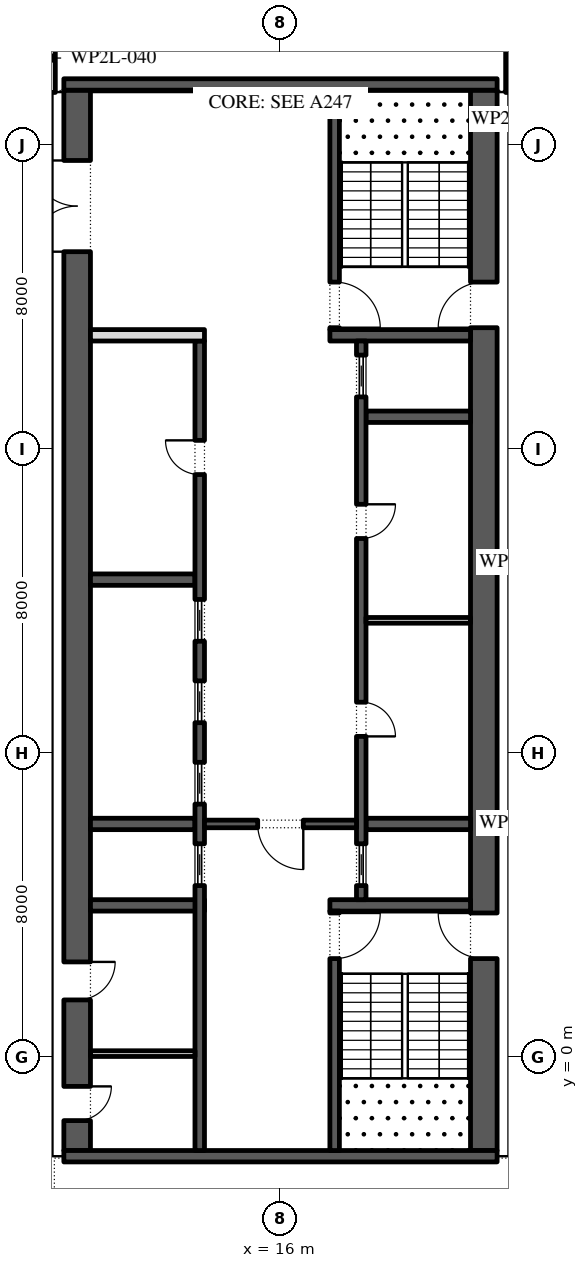
"""IFC4 building model, lengths in metres.
Left out: names, types, materials, properties, quantities, classifications, styles, units other than length and angle.
Written with IfcOpenShell. Run it as: python <this file> out.ifc"""

import sys

from ifc_helpers import new_model, si_unit, direction, frame, frame_2d, origin, place, context, subcontext, project, spatial, rectangle, extrude, element, fill, save


model = new_model("IFC4")
c1 = context("Model", 3, precision=1e-05, world=origin(), true_north=direction((0.0, 1.0)))
c2 = subcontext(c1, "Body", "Model", "MODEL_VIEW")
j1 = project(units=[si_unit("LENGTHUNIT", "METRE"), si_unit("PLANEANGLEUNIT", "RADIAN")], contexts=[c1])
p1 = place(None, origin())
s1 = spatial("IfcSite", under=j1, at=p1, CompositionType="ELEMENT")
p2 = place(p1, origin())
s2 = spatial("IfcBuilding", under=s1, at=p2, CompositionType="ELEMENT")
p3 = place(p2, frame((0.0, 0.0, 201.0)))
s3 = spatial("IfcBuildingStorey", under=s2, at=p3, CompositionType="ELEMENT", Elevation=201.0)
p4 = place(p3, frame((33.157, -5.092, 0.0), z_axis=(0.0, 0.0, 1.0), x_axis=(-0.224950279389, 0.974370243697, 0.0)))
e1 = element("IfcWall", 1, at=p4, inside=s3, PredefinedType="STANDARD", context=c2, shape_type="SweptSolid", body=[
    extrude(rectangle(XDim=49.5, YDim=0.3, at=frame_2d((24.75, 0.0))), origin(), (0.0, 0.0, 1.0), 4.0),
])
p5 = place(p4, frame((2.207, 0.0, 0.0)))
e2 = element("IfcOpeningElement", 2, at=p5, cuts=e1, PredefinedType="OPENING", context=c2, shape_type="SweptSolid", body=[
    extrude(rectangle(XDim=2.4, YDim=3.125, at=frame_2d((1.2, 1.562))), frame((0.0, 0.16, 0.0), z_axis=(0.0, -1.0, 0.0), x_axis=(1.0, 0.0, 0.0)), (0.0, 0.0, 1.0), 0.32),
])
p6 = place(p4, frame((8.121, 0.0, 0.45)))
e3 = element("IfcOpeningElement", 3, at=p6, cuts=e1, PredefinedType="OPENING", context=c2, shape_type="SweptSolid", body=[
    extrude(rectangle(XDim=4.5, YDim=2.875, at=frame_2d((2.25, 1.438))), frame((0.0, 0.16, 0.0), z_axis=(0.0, -1.0, 0.0), x_axis=(1.0, 0.0, 0.0)), (0.0, 0.0, 1.0), 0.32),
])
p7 = place(p4, frame((15.236, 0.0, 0.45)))
e4 = element("IfcOpeningElement", 4, at=p7, cuts=e1, PredefinedType="OPENING", context=c2, shape_type="SweptSolid", body=[
    extrude(rectangle(XDim=4.5, YDim=2.875, at=frame_2d((2.25, 1.438))), frame((0.0, 0.16, 0.0), z_axis=(0.0, -1.0, 0.0), x_axis=(1.0, 0.0, 0.0)), (0.0, 0.0, 1.0), 0.32),
])
p8 = place(p4, frame((22.35, 0.0, 0.45)))
e5 = element("IfcOpeningElement", 5, at=p8, cuts=e1, PredefinedType="OPENING", context=c2, shape_type="SweptSolid", body=[
    extrude(rectangle(XDim=4.5, YDim=3.0, at=frame_2d((2.25, 1.5))), frame((0.0, 0.16, 0.0), z_axis=(0.0, -1.0, 0.0), x_axis=(1.0, 0.0, 0.0)), (0.0, 0.0, 1.0), 0.32),
])
p9 = place(p4, frame((30.514, 0.0, 0.0)))
e6 = element("IfcOpeningElement", 6, at=p9, cuts=e1, PredefinedType="OPENING", context=c2, shape_type="SweptSolid", body=[
    extrude(rectangle(XDim=2.4, YDim=3.45, at=frame_2d((1.2, 1.725))), frame((0.0, 0.16, 0.0), z_axis=(0.0, -1.0, 0.0), x_axis=(1.0, 0.0, 0.0)), (0.0, 0.0, 1.0), 0.32),
])
p10 = place(p4, frame((36.579, 0.0, 0.45)))
e7 = element("IfcOpeningElement", 7, at=p10, cuts=e1, PredefinedType="OPENING", context=c2, shape_type="SweptSolid", body=[
    extrude(rectangle(XDim=4.5, YDim=3.05, at=frame_2d((2.25, 1.525))), frame((0.0, 0.16, 0.0), z_axis=(0.0, -1.0, 0.0), x_axis=(1.0, 0.0, 0.0)), (0.0, 0.0, 1.0), 0.32),
])
p11 = place(p4, frame((43.693, 0.0, 0.45)))
e8 = element("IfcOpeningElement", 8, at=p11, cuts=e1, PredefinedType="OPENING", context=c2, shape_type="SweptSolid", body=[
    extrude(rectangle(XDim=4.5, YDim=3.05, at=frame_2d((2.25, 1.525))), frame((0.0, 0.16, 0.0), z_axis=(0.0, -1.0, 0.0), x_axis=(1.0, 0.0, 0.0)), (0.0, 0.0, 1.0), 0.32),
])
p12 = place(p3, frame((21.35, -2.45, 0.0), z_axis=(0.0, 0.0, 1.0), x_axis=(0.0, 1.0, 0.0)))
e9 = element("IfcWall", 9, at=p12, inside=s3, PredefinedType="SHEAR", context=c2, shape_type="SweptSolid", body=[
    extrude(rectangle(XDim=27.9, YDim=0.7, at=frame_2d((13.95, 0.0))), origin(), (0.0, 0.0, 1.0), 4.0),
])
p13 = place(p12, frame((5.05, 0.0, 0.0)))
e10 = element("IfcOpeningElement", 10, at=p13, cuts=e9, PredefinedType="OPENING", context=c2, shape_type="SweptSolid", body=[
    extrude(rectangle(XDim=1.2, YDim=2.1, at=frame_2d((0.6, 1.05))), frame((0.0, 0.36, 0.0), z_axis=(0.0, -1.0, 0.0), x_axis=(1.0, 0.0, 0.0)), (0.0, 0.0, 1.0), 0.72),
])
p14 = place(p12, frame((21.65, 0.0, 0.0)))
e11 = element("IfcOpeningElement", 11, at=p14, cuts=e9, PredefinedType="OPENING", context=c2, shape_type="SweptSolid", body=[
    extrude(rectangle(XDim=1.2, YDim=2.1, at=frame_2d((0.6, 1.05))), frame((0.0, 0.36, 0.0), z_axis=(0.0, -1.0, 0.0), x_axis=(1.0, 0.0, 0.0)), (0.0, 0.0, 1.0), 0.72),
])
p15 = place(p3, frame((10.65, -2.45, 0.0), z_axis=(0.0, 0.0, 1.0), x_axis=(0.0, 1.0, 0.0)))
e12 = element("IfcWall", 12, at=p15, inside=s3, PredefinedType="SHEAR", context=c2, shape_type="SweptSolid", body=[
    extrude(rectangle(XDim=27.9, YDim=0.7, at=frame_2d((13.95, 0.0))), origin(), (0.0, 0.0, 1.0), 4.0),
])
p16 = place(p15, frame((23.65, 0.0, 0.0)))
e13 = element("IfcOpeningElement", 13, at=p16, cuts=e12, PredefinedType="OPENING", context=c2, shape_type="SweptSolid", body=[
    extrude(rectangle(XDim=2.4, YDim=2.1, at=frame_2d((1.2, 1.05))), frame((0.0, 0.36, 0.0), z_axis=(0.0, -1.0, 0.0), x_axis=(1.0, 0.0, 0.0)), (0.0, 0.0, 1.0), 0.72),
])
p17 = place(p15, frame((0.788, 0.0, 0.0)))
e14 = element("IfcOpeningElement", 14, at=p17, cuts=e12, PredefinedType="OPENING", context=c2, shape_type="SweptSolid", body=[
    extrude(rectangle(XDim=0.9, YDim=2.1, at=frame_2d((0.45, 1.05))), frame((0.0, 0.36, 0.0), z_axis=(0.0, -1.0, 0.0), x_axis=(1.0, 0.0, 0.0)), (0.0, 0.0, 1.0), 0.72),
])
p18 = place(p15, frame((3.962, 0.0, 0.0)))
e15 = element("IfcOpeningElement", 15, at=p18, cuts=e12, PredefinedType="OPENING", context=c2, shape_type="SweptSolid", body=[
    extrude(rectangle(XDim=1.0, YDim=2.1, at=frame_2d((0.5, 1.05))), frame((0.0, 0.36, 0.0), z_axis=(0.0, -1.0, 0.0), x_axis=(1.0, 0.0, 0.0)), (0.0, 0.0, 1.0), 0.72),
])
for number, where, z_axis, x_axis in (
    (16, (10.3, -2.6, 0.0), (0.0, 0.0, 1.0), (1.0, 0.0, 0.0)),
    (17, (10.3, 25.6, 0.0), (0.0, 0.0, 1.0), (1.0, 0.0, 0.0)),
):
    element("IfcWall", number, at=place(p3, frame(where, z_axis=z_axis, x_axis=x_axis)), inside=s3, PredefinedType="SHEAR", context=c2, shape_type="SweptSolid", body=[
        extrude(rectangle(XDim=11.4, YDim=0.3, at=frame_2d((5.7, 0.0))), origin(), (0.0, 0.0, 1.0), 4.0),
    ])
p19 = place(p3, frame((17.3, 4.0, 0.0), z_axis=(0.0, 0.0, 1.0), x_axis=(1.0, 0.0, 0.0)))
e18 = element("IfcWall", 18, at=p19, inside=s3, PredefinedType="SHEAR", context=c2, shape_type="SweptSolid", body=[
    extrude(rectangle(XDim=3.7, YDim=0.3, at=frame_2d((1.85, 0.0))), origin(), (0.0, 0.0, 1.0), 4.0),
])
p20 = place(p3, frame((17.425, -2.45, 0.0), z_axis=(0.0, 0.0, 1.0), x_axis=(0.0, 1.0, 0.0)))
e19 = element("IfcWall", 19, at=p20, inside=s3, PredefinedType="SHEAR", context=c2, shape_type="SweptSolid", body=[
    extrude(rectangle(XDim=6.3, YDim=0.25, at=frame_2d((3.15, 0.0))), origin(), (0.0, 0.0, 1.0), 4.0),
])
p21 = place(p20, frame((5.05, 0.0, 0.0)))
e20 = element("IfcOpeningElement", 20, at=p21, cuts=e19, PredefinedType="OPENING", context=c2, shape_type="SweptSolid", body=[
    extrude(rectangle(XDim=1.2, YDim=2.1, at=frame_2d((0.6, 1.05))), frame((0.0, 0.135, 0.0), z_axis=(0.0, -1.0, 0.0), x_axis=(1.0, 0.0, 0.0)), (0.0, 0.0, 1.0), 0.27),
])
p22 = place(p3, frame((17.3, 19.0, 0.0), z_axis=(0.0, 0.0, 1.0), x_axis=(1.0, 0.0, 0.0)))
e21 = element("IfcWall", 21, at=p22, inside=s3, PredefinedType="SHEAR", context=c2, shape_type="SweptSolid", body=[
    extrude(rectangle(XDim=3.7, YDim=0.3, at=frame_2d((1.85, 0.0))), origin(), (0.0, 0.0, 1.0), 4.0),
])
p23 = place(p3, frame((17.425, 19.15, 0.0), z_axis=(0.0, 0.0, 1.0), x_axis=(0.0, 1.0, 0.0)))
e22 = element("IfcWall", 22, at=p23, inside=s3, PredefinedType="SHEAR", context=c2, shape_type="SweptSolid", body=[
    extrude(rectangle(XDim=6.3, YDim=0.25, at=frame_2d((3.15, 0.0))), origin(), (0.0, 0.0, 1.0), 4.0),
])
p24 = place(p23, frame((0.05, 0.0, 0.0)))
e23 = element("IfcOpeningElement", 23, at=p24, cuts=e22, PredefinedType="OPENING", context=c2, shape_type="SweptSolid", body=[
    extrude(rectangle(XDim=1.2, YDim=2.1, at=frame_2d((0.6, 1.05))), frame((0.0, 0.135, 0.0), z_axis=(0.0, -1.0, 0.0), x_axis=(1.0, 0.0, 0.0)), (0.0, 0.0, 1.0), 0.27),
])
for number, where, z_axis, x_axis in (
    (24, (18.25, 6.143, 0.0), (0.0, 0.0, 1.0), (1.0, 0.0, 0.0)),
    (25, (18.25, 16.857, 0.0), (0.0, 0.0, 1.0), (1.0, 0.0, 0.0)),
):
    element("IfcWall", number, at=place(p3, frame(where, z_axis=z_axis, x_axis=x_axis)), inside=s3, PredefinedType="SHEAR", context=c2, shape_type="SweptSolid", body=[
        extrude(rectangle(XDim=2.75, YDim=0.3, at=frame_2d((1.375, 0.0))), origin(), (0.0, 0.0, 1.0), 4.0),
    ])
p25 = place(p3, frame((18.125, 4.15, 0.0), z_axis=(0.0, 0.0, 1.0), x_axis=(0.0, 1.0, 0.0)))
e26 = element("IfcWall", 26, at=p25, inside=s3, PredefinedType="SHEAR", context=c2, shape_type="SweptSolid", body=[
    extrude(rectangle(XDim=14.7, YDim=0.25, at=frame_2d((7.35, 0.0))), origin(), (0.0, 0.0, 1.0), 4.0),
])
p26 = place(p25, frame((4.296, 0.0, 0.0)))
e27 = element("IfcOpeningElement", 27, at=p26, cuts=e26, PredefinedType="OPENING", context=c2, shape_type="SweptSolid", body=[
    extrude(rectangle(XDim=0.9, YDim=2.1, at=frame_2d((0.45, 1.05))), frame((0.0, 0.135, 0.0), z_axis=(0.0, -1.0, 0.0), x_axis=(1.0, 0.0, 0.0)), (0.0, 0.0, 1.0), 0.27),
])
p27 = place(p25, frame((9.504, 0.0, 0.0)))
e28 = element("IfcOpeningElement", 28, at=p27, cuts=e26, PredefinedType="OPENING", context=c2, shape_type="SweptSolid", body=[
    extrude(rectangle(XDim=0.9, YDim=2.1, at=frame_2d((0.45, 1.05))), frame((0.0, 0.135, 0.0), z_axis=(0.0, -1.0, 0.0), x_axis=(1.0, 0.0, 0.0)), (0.0, 0.0, 1.0), 0.27),
])
p28 = place(p25, frame((0.371, 0.0, 0.0)))
e29 = element("IfcOpeningElement", 29, at=p28, cuts=e26, PredefinedType="OPENING", context=c2, shape_type="SweptSolid", body=[
    extrude(rectangle(XDim=1.1, YDim=2.1, at=frame_2d((0.55, 1.05))), frame((0.0, 0.135, 0.0), z_axis=(0.0, -1.0, 0.0), x_axis=(1.0, 0.0, 0.0)), (0.0, 0.0, 1.0), 0.27),
])
p29 = place(p25, frame((13.229, 0.0, 0.0)))
e30 = element("IfcOpeningElement", 30, at=p29, cuts=e26, PredefinedType="OPENING", context=c2, shape_type="SweptSolid", body=[
    extrude(rectangle(XDim=1.1, YDim=2.1, at=frame_2d((0.55, 1.05))), frame((0.0, 0.135, 0.0), z_axis=(0.0, -1.0, 0.0), x_axis=(1.0, 0.0, 0.0)), (0.0, 0.0, 1.0), 0.27),
])
p30 = place(p3, frame((18.25, 11.5, 0.0), z_axis=(0.0, 0.0, 1.0), x_axis=(1.0, 0.0, 0.0)))
e31 = element("IfcWall", 31, at=p30, inside=s3, PredefinedType="PARTITIONING", context=c2, shape_type="SweptSolid", body=[
    extrude(rectangle(XDim=2.75, YDim=0.15, at=frame_2d((1.375, 0.0))), origin(), (0.0, 0.0, 1.0), 4.0),
])
p31 = place(p3, frame((11.0, 4.0, 0.0), z_axis=(0.0, 0.0, 1.0), x_axis=(1.0, 0.0, 0.0)))
e32 = element("IfcWall", 32, at=p31, inside=s3, PredefinedType="SHEAR", context=c2, shape_type="SweptSolid", body=[
    extrude(rectangle(XDim=3.0, YDim=0.3, at=frame_2d((1.5, 0.0))), origin(), (0.0, 0.0, 1.0), 4.0),
])
for number, where, z_axis, x_axis in (
    (33, (11.0, 6.143, 0.0), (0.0, 0.0, 1.0), (1.0, 0.0, 0.0)),
    (34, (11.0, 12.571, 0.0), (0.0, 0.0, 1.0), (1.0, 0.0, 0.0)),
):
    element("IfcWall", number, at=place(p3, frame(where, z_axis=z_axis, x_axis=x_axis)), inside=s3, PredefinedType="SHEAR", context=c2, shape_type="SweptSolid", body=[
        extrude(rectangle(XDim=2.75, YDim=0.3, at=frame_2d((1.375, 0.0))), origin(), (0.0, 0.0, 1.0), 4.0),
    ])
p32 = place(p3, frame((13.875, -2.45, 0.0), z_axis=(0.0, 0.0, 1.0), x_axis=(0.0, 1.0, 0.0)))
e35 = element("IfcWall", 35, at=p32, inside=s3, PredefinedType="SHEAR", context=c2, shape_type="SweptSolid", body=[
    extrude(rectangle(XDim=21.3, YDim=0.25, at=frame_2d((10.65, 0.0))), origin(), (0.0, 0.0, 1.0), 4.0),
])
p33 = place(p32, frame((17.786, 0.0, 0.0)))
e36 = element("IfcOpeningElement", 36, at=p33, cuts=e35, PredefinedType="OPENING", context=c2, shape_type="SweptSolid", body=[
    extrude(rectangle(XDim=0.9, YDim=2.1, at=frame_2d((0.45, 1.05))), frame((0.0, 0.135, 0.0), z_axis=(0.0, -1.0, 0.0), x_axis=(1.0, 0.0, 0.0)), (0.0, 0.0, 1.0), 0.27),
])
p34 = place(p32, frame((6.971, 0.0, 0.0)))
e37 = element("IfcOpeningElement", 37, at=p34, cuts=e35, PredefinedType="OPENING", context=c2, shape_type="SweptSolid", body=[
    extrude(rectangle(XDim=1.1, YDim=2.1, at=frame_2d((0.55, 1.05))), frame((0.0, 0.135, 0.0), z_axis=(0.0, -1.0, 0.0), x_axis=(1.0, 0.0, 0.0)), (0.0, 0.0, 1.0), 0.27),
])
p35 = place(p32, frame((9.114, 0.0, 0.0)))
e38 = element("IfcOpeningElement", 38, at=p35, cuts=e35, PredefinedType="OPENING", context=c2, shape_type="SweptSolid", body=[
    extrude(rectangle(XDim=1.1, YDim=2.1, at=frame_2d((0.55, 1.05))), frame((0.0, 0.135, 0.0), z_axis=(0.0, -1.0, 0.0), x_axis=(1.0, 0.0, 0.0)), (0.0, 0.0, 1.0), 0.27),
])
p36 = place(p32, frame((11.257, 0.0, 0.0)))
e39 = element("IfcOpeningElement", 39, at=p36, cuts=e35, PredefinedType="OPENING", context=c2, shape_type="SweptSolid", body=[
    extrude(rectangle(XDim=1.1, YDim=2.1, at=frame_2d((0.55, 1.05))), frame((0.0, 0.135, 0.0), z_axis=(0.0, -1.0, 0.0), x_axis=(1.0, 0.0, 0.0)), (0.0, 0.0, 1.0), 0.27),
])
p37 = place(p32, frame((13.4, 0.0, 0.0)))
e40 = element("IfcOpeningElement", 40, at=p37, cuts=e35, PredefinedType="OPENING", context=c2, shape_type="SweptSolid", body=[
    extrude(rectangle(XDim=1.1, YDim=2.1, at=frame_2d((0.55, 1.05))), frame((0.0, 0.135, 0.0), z_axis=(0.0, -1.0, 0.0), x_axis=(1.0, 0.0, 0.0)), (0.0, 0.0, 1.0), 0.27),
])
p38 = place(p3, frame((11.0, 19.0, 0.0), z_axis=(0.0, 0.0, 1.0), x_axis=(1.0, 0.0, 0.0)))
e41 = element("IfcWall", 41, at=p38, inside=s3, PredefinedType="PARTITIONING", context=c2, shape_type="SweptSolid", body=[
    extrude(rectangle(XDim=3.0, YDim=0.3, at=frame_2d((1.5, 0.0))), origin(), (0.0, 0.0, 1.0), 4.0),
])
p39 = place(p3, frame((14.0, 6.143, 0.0), z_axis=(0.0, 0.0, 1.0), x_axis=(1.0, 0.0, 0.0)))
e42 = element("IfcWall", 42, at=p39, inside=s3, PredefinedType="SHEAR", context=c2, shape_type="SweptSolid", body=[
    extrude(rectangle(XDim=4.0, YDim=0.2, at=frame_2d((2.0, 0.0))), origin(), (0.0, 0.0, 1.0), 4.0),
])
p40 = place(p39, frame((1.4, 0.0, 0.0)))
e43 = element("IfcOpeningElement", 43, at=p40, cuts=e42, PredefinedType="OPENING", context=c2, shape_type="SweptSolid", body=[
    extrude(rectangle(XDim=1.2, YDim=2.1, at=frame_2d((0.6, 1.05))), frame((0.0, 0.11, 0.0), z_axis=(0.0, -1.0, 0.0), x_axis=(1.0, 0.0, 0.0)), (0.0, 0.0, 1.0), 0.22),
])
p41 = place(p3, frame((11.0, 0.1, 0.0), z_axis=(0.0, 0.0, 1.0), x_axis=(1.0, 0.0, 0.0)))
e44 = element("IfcWall", 44, at=p41, inside=s3, PredefinedType="PARTITIONING", context=c2, shape_type="SweptSolid", body=[
    extrude(rectangle(XDim=2.75, YDim=0.15, at=frame_2d((1.375, 0.0))), origin(), (0.0, 0.0, 1.0), 4.0),
])
p42 = place(p3, frame((10.0, 27.2, 0.0), z_axis=(0.0, 0.0, 1.0), x_axis=(0.0, -1.0, 0.0)))
e45 = element("IfcWall", 45, at=p42, inside=s3, PredefinedType="PARTITIONING", context=c2, shape_type="SweptSolid", body=[
    extrude(rectangle(XDim=1.81, YDim=0.15, at=frame_2d((0.905, 0.0))), origin(), (0.0, 0.0, 1.0), 3.02),
])
p43 = place(p3, frame((22.0, 25.39, 0.0), z_axis=(0.0, 0.0, 1.0), x_axis=(0.0, 1.0, 0.0)))
e46 = element("IfcWall", 46, at=p43, inside=s3, PredefinedType="PARTITIONING", context=c2, shape_type="SweptSolid", body=[
    extrude(rectangle(XDim=1.81, YDim=0.15, at=frame_2d((0.905, 0.0))), origin(), (0.0, 0.0, 1.0), 4.0),
])
p44 = place(p26, frame((0.9, -0.2, 0.0), z_axis=(0.0, 0.0, 1.0), x_axis=(-1.0, 0.0, 0.0)))
e47 = element("IfcDoor", 47, at=p44, inside=s3, OperationType="SINGLE_SWING_LEFT", PredefinedType="DOOR", context=c2, shape_type="SweptSolid", body=[
    extrude(rectangle(XDim=0.9, YDim=2.1, at=frame_2d((0.45, 1.05))), frame((0.0, -0.075, 0.0), z_axis=(0.0, -1.0, 0.0), x_axis=(1.0, 0.0, 0.0)), (0.0, 0.0, 1.0), 0.05),
])
fill(e27, e47)
p45 = place(p27, frame((0.9, -0.2, 0.0), z_axis=(0.0, 0.0, 1.0), x_axis=(-1.0, 0.0, 0.0)))
e48 = element("IfcDoor", 48, at=p45, inside=s3, OperationType="SINGLE_SWING_RIGHT", PredefinedType="DOOR", context=c2, shape_type="SweptSolid", body=[
    extrude(rectangle(XDim=0.9, YDim=2.1, at=frame_2d((0.45, 1.05))), frame((0.0, -0.075, 0.0), z_axis=(0.0, -1.0, 0.0), x_axis=(1.0, 0.0, 0.0)), (0.0, 0.0, 1.0), 0.05),
])
fill(e28, e48)
p46 = place(p28, origin())
e49 = element("IfcDoor", 49, at=p46, inside=s3, OperationType="SLIDING_TO_LEFT", PredefinedType="DOOR", context=c2, shape_type="SweptSolid", body=[
    extrude(rectangle(XDim=1.1, YDim=2.1, at=frame_2d((0.55, 1.05))), frame((0.0, 0.025, 0.0), z_axis=(0.0, -1.0, 0.0), x_axis=(1.0, 0.0, 0.0)), (0.0, 0.0, 1.0), 0.05),
])
fill(e29, e49)
p47 = place(p29, origin())
e50 = element("IfcDoor", 50, at=p47, inside=s3, OperationType="SLIDING_TO_LEFT", PredefinedType="DOOR", context=c2, shape_type="SweptSolid", body=[
    extrude(rectangle(XDim=1.1, YDim=2.1, at=frame_2d((0.55, 1.05))), frame((0.0, 0.025, 0.0), z_axis=(0.0, -1.0, 0.0), x_axis=(1.0, 0.0, 0.0)), (0.0, 0.0, 1.0), 0.05),
])
fill(e30, e50)
p48 = place(p33, origin())
e51 = element("IfcDoor", 51, at=p48, inside=s3, OperationType="SINGLE_SWING_LEFT", PredefinedType="DOOR", context=c2, shape_type="SweptSolid", body=[
    extrude(rectangle(XDim=0.9, YDim=2.1, at=frame_2d((0.45, 1.05))), frame((0.0, 0.125, 0.0), z_axis=(0.0, -1.0, 0.0), x_axis=(1.0, 0.0, 0.0)), (0.0, 0.0, 1.0), 0.05),
])
fill(e36, e51)
p49 = place(p34, origin())
e52 = element("IfcDoor", 52, at=p49, inside=s3, OperationType="SLIDING_TO_LEFT", PredefinedType="DOOR", context=c2, shape_type="SweptSolid", body=[
    extrude(rectangle(XDim=1.1, YDim=2.1, at=frame_2d((0.55, 1.05))), frame((0.0, 0.025, 0.0), z_axis=(0.0, -1.0, 0.0), x_axis=(1.0, 0.0, 0.0)), (0.0, 0.0, 1.0), 0.05),
])
fill(e37, e52)
p50 = place(p35, origin())
e53 = element("IfcDoor", 53, at=p50, inside=s3, OperationType="SLIDING_TO_LEFT", PredefinedType="DOOR", context=c2, shape_type="SweptSolid", body=[
    extrude(rectangle(XDim=1.1, YDim=2.1, at=frame_2d((0.55, 1.05))), frame((0.0, 0.025, 0.0), z_axis=(0.0, -1.0, 0.0), x_axis=(1.0, 0.0, 0.0)), (0.0, 0.0, 1.0), 0.05),
])
fill(e38, e53)
p51 = place(p36, origin())
e54 = element("IfcDoor", 54, at=p51, inside=s3, OperationType="SLIDING_TO_LEFT", PredefinedType="DOOR", context=c2, shape_type="SweptSolid", body=[
    extrude(rectangle(XDim=1.1, YDim=2.1, at=frame_2d((0.55, 1.05))), frame((0.0, 0.025, 0.0), z_axis=(0.0, -1.0, 0.0), x_axis=(1.0, 0.0, 0.0)), (0.0, 0.0, 1.0), 0.05),
])
fill(e39, e54)
p52 = place(p37, origin())
e55 = element("IfcDoor", 55, at=p52, inside=s3, OperationType="SLIDING_TO_LEFT", PredefinedType="DOOR", context=c2, shape_type="SweptSolid", body=[
    extrude(rectangle(XDim=1.1, YDim=2.1, at=frame_2d((0.55, 1.05))), frame((0.0, 0.025, 0.0), z_axis=(0.0, -1.0, 0.0), x_axis=(1.0, 0.0, 0.0)), (0.0, 0.0, 1.0), 0.05),
])
fill(e40, e55)
p53 = place(p40, frame((1.2, 0.0, 0.0), z_axis=(0.0, 0.0, 1.0), x_axis=(-1.0, 0.0, 0.0)))
e56 = element("IfcDoor", 56, at=p53, inside=s3, OperationType="SINGLE_SWING_RIGHT", PredefinedType="DOOR", context=c2, shape_type="SweptSolid", body=[
    extrude(rectangle(XDim=1.2, YDim=2.1, at=frame_2d((0.6, 1.05))), frame((0.0, 0.025, 0.0), z_axis=(0.0, -1.0, 0.0), x_axis=(1.0, 0.0, 0.0)), (0.0, 0.0, 1.0), 0.05),
])
fill(e43, e56)
p54 = place(p16, origin())
e57 = element("IfcDoor", 57, at=p54, inside=s3, OperationType="DOUBLE_DOOR_SINGLE_SWING", PredefinedType="DOOR", context=c2, shape_type="SweptSolid", body=[
    extrude(rectangle(XDim=2.4, YDim=2.1, at=frame_2d((1.2, 1.05))), frame((0.0, 0.025, 0.0), z_axis=(0.0, -1.0, 0.0), x_axis=(1.0, 0.0, 0.0)), (0.0, 0.0, 1.0), 0.05),
])
fill(e13, e57)
p55 = place(p21, frame((1.2, 0.0, 0.0), z_axis=(0.0, 0.0, 1.0), x_axis=(-1.0, 0.0, 0.0)))
e58 = element("IfcDoor", 58, at=p55, inside=s3, OperationType="SINGLE_SWING_RIGHT", PredefinedType="DOOR", context=c2, shape_type="SweptSolid", body=[
    extrude(rectangle(XDim=1.2, YDim=2.1, at=frame_2d((0.6, 1.05))), frame((0.0, 0.025, 0.0), z_axis=(0.0, -1.0, 0.0), x_axis=(1.0, 0.0, 0.0)), (0.0, 0.0, 1.0), 0.05),
])
fill(e20, e58)
p56 = place(p13, origin())
e59 = element("IfcDoor", 59, at=p56, inside=s3, OperationType="SINGLE_SWING_LEFT", PredefinedType="DOOR", context=c2, shape_type="SweptSolid", body=[
    extrude(rectangle(XDim=1.2, YDim=2.1, at=frame_2d((0.6, 1.05))), frame((0.0, 0.025, 0.0), z_axis=(0.0, -1.0, 0.0), x_axis=(1.0, 0.0, 0.0)), (0.0, 0.0, 1.0), 0.05),
])
fill(e10, e59)
p57 = place(p24, frame((1.2, 0.0, 0.0), z_axis=(0.0, 0.0, 1.0), x_axis=(-1.0, 0.0, 0.0)))
e60 = element("IfcDoor", 60, at=p57, inside=s3, OperationType="SINGLE_SWING_LEFT", PredefinedType="DOOR", context=c2, shape_type="SweptSolid", body=[
    extrude(rectangle(XDim=1.2, YDim=2.1, at=frame_2d((0.6, 1.05))), frame((0.0, 0.025, 0.0), z_axis=(0.0, -1.0, 0.0), x_axis=(1.0, 0.0, 0.0)), (0.0, 0.0, 1.0), 0.05),
])
fill(e23, e60)
p58 = place(p14, origin())
e61 = element("IfcDoor", 61, at=p58, inside=s3, OperationType="SINGLE_SWING_RIGHT", PredefinedType="DOOR", context=c2, shape_type="SweptSolid", body=[
    extrude(rectangle(XDim=1.2, YDim=2.1, at=frame_2d((0.6, 1.05))), frame((0.0, 0.025, 0.0), z_axis=(0.0, -1.0, 0.0), x_axis=(1.0, 0.0, 0.0)), (0.0, 0.0, 1.0), 0.05),
])
fill(e11, e61)
p59 = place(p17, frame((0.9, -0.65, 0.0), z_axis=(0.0, 0.0, 1.0), x_axis=(-1.0, 0.0, 0.0)))
e62 = element("IfcDoor", 62, at=p59, inside=s3, OperationType="SINGLE_SWING_RIGHT", PredefinedType="DOOR", context=c2, shape_type="SweptSolid", body=[
    extrude(rectangle(XDim=0.9, YDim=2.1, at=frame_2d((0.45, 1.05))), frame((0.0, -0.3, 0.0), z_axis=(0.0, -1.0, 0.0), x_axis=(1.0, 0.0, 0.0)), (0.0, 0.0, 1.0), 0.05),
])
fill(e14, e62)
p60 = place(p18, frame((1.0, -0.65, 0.0), z_axis=(0.0, 0.0, 1.0), x_axis=(-1.0, 0.0, 0.0)))
e63 = element("IfcDoor", 63, at=p60, inside=s3, OperationType="SINGLE_SWING_RIGHT", PredefinedType="DOOR", context=c2, shape_type="SweptSolid", body=[
    extrude(rectangle(XDim=1.0, YDim=2.1, at=frame_2d((0.5, 1.05))), frame((0.0, -0.3, 0.0), z_axis=(0.0, -1.0, 0.0), x_axis=(1.0, 0.0, 0.0)), (0.0, 0.0, 1.0), 0.05),
])
fill(e15, e63)
save(model, sys.argv[1])
